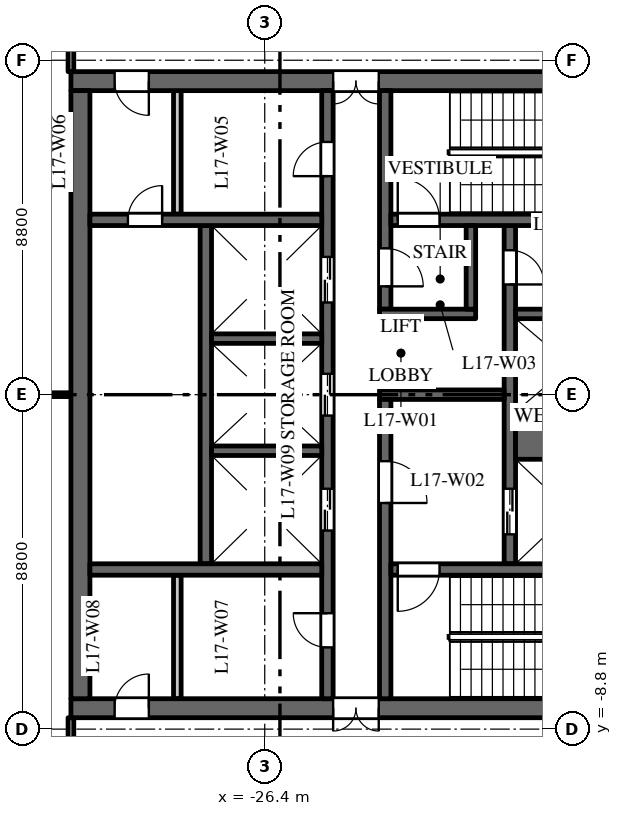
"""IFC4 building model, lengths in metres.
Left out: names, types, materials, properties, quantities, classifications, styles, units other than length and angle.
Written with IfcOpenShell. Run it as: python <this file> out.ifc"""

import sys

from ifc_helpers import new_model, si_unit, direction, frame, frame_2d, origin, place, context, subcontext, project, spatial, rectangle, extrude, element, fill, save


model = new_model("IFC4")
c1 = context("Model", 3, precision=1e-05, world=origin(), true_north=direction((0.0, 1.0)))
c2 = subcontext(c1, "Body", "Model", "MODEL_VIEW")
j1 = project(units=[si_unit("LENGTHUNIT", "METRE"), si_unit("PLANEANGLEUNIT", "RADIAN")], contexts=[c1])
p1 = place(None, origin())
s1 = spatial("IfcSite", under=j1, at=p1, CompositionType="ELEMENT")
p2 = place(p1, origin())
s2 = spatial("IfcBuilding", under=s1, at=p2, CompositionType="ELEMENT")
p3 = place(p2, frame((0.0, 0.0, 78.5)))
s3 = spatial("IfcBuildingStorey", under=s2, at=p3, CompositionType="ELEMENT", Elevation=78.5)
p4 = place(p3, frame((-16.5, 8.25, 0.0), z_axis=(0.0, 0.0, 1.0), x_axis=(-1.0, 0.0, 0.0)))
e1 = element("IfcWall", 1, at=p4, inside=s3, PredefinedType="SHEAR", context=c2, shape_type="SweptSolid", body=[
    extrude(rectangle(XDim=15.0, YDim=0.5, at=frame_2d((7.5, 0.0))), origin(), (0.0, 0.0, 1.0), 3.7),
])
p5 = place(p4, frame((6.9, 0.0, 0.0)))
e2 = element("IfcOpeningElement", 2, at=p5, cuts=e1, PredefinedType="OPENING", context=c2, shape_type="SweptSolid", body=[
    extrude(rectangle(XDim=1.2, YDim=2.1, at=frame_2d((0.6, 1.05))), frame((0.0, 0.26, 0.0), z_axis=(0.0, -1.0, 0.0), x_axis=(1.0, 0.0, 0.0)), (0.0, 0.0, 1.0), 0.52),
])
p6 = place(p4, frame((12.95, 0.0, 0.0)))
e3 = element("IfcOpeningElement", 3, at=p6, cuts=e1, PredefinedType="OPENING", context=c2, shape_type="SweptSolid", body=[
    extrude(rectangle(XDim=0.9, YDim=2.1, at=frame_2d((0.45, 1.05))), frame((0.0, 0.26, 0.0), z_axis=(0.0, -1.0, 0.0), x_axis=(1.0, 0.0, 0.0)), (0.0, 0.0, 1.0), 0.52),
])
p7 = place(p3, frame((-16.5, -8.25, 0.0), z_axis=(0.0, 0.0, 1.0), x_axis=(-1.0, 0.0, 0.0)))
e4 = element("IfcWall", 4, at=p7, inside=s3, PredefinedType="SHEAR", context=c2, shape_type="SweptSolid", body=[
    extrude(rectangle(XDim=15.0, YDim=0.5, at=frame_2d((7.5, 0.0))), origin(), (0.0, 0.0, 1.0), 3.7),
])
p8 = place(p7, frame((6.9, 0.0, 0.0)))
e5 = element("IfcOpeningElement", 5, at=p8, cuts=e4, PredefinedType="OPENING", context=c2, shape_type="SweptSolid", body=[
    extrude(rectangle(XDim=1.2, YDim=2.1, at=frame_2d((0.6, 1.05))), frame((0.0, 0.26, 0.0), z_axis=(0.0, -1.0, 0.0), x_axis=(1.0, 0.0, 0.0)), (0.0, 0.0, 1.0), 0.52),
])
p9 = place(p7, frame((12.95, 0.0, 0.0)))
e6 = element("IfcOpeningElement", 6, at=p9, cuts=e4, PredefinedType="OPENING", context=c2, shape_type="SweptSolid", body=[
    extrude(rectangle(XDim=0.9, YDim=2.1, at=frame_2d((0.45, 1.05))), frame((0.0, 0.26, 0.0), z_axis=(0.0, -1.0, 0.0), x_axis=(1.0, 0.0, 0.0)), (0.0, 0.0, 1.0), 0.52),
])
p10 = place(p3, frame((-27.95, -4.45, 0.0), z_axis=(0.0, 0.0, 1.0), x_axis=(0.0, 1.0, 0.0)))
e7 = element("IfcWall", 7, at=p10, inside=s3, PredefinedType="SHEAR", context=c2, shape_type="SweptSolid", body=[
    extrude(rectangle(XDim=8.9, YDim=0.3, at=frame_2d((4.45, 0.0))), origin(), (0.0, 0.0, 1.0), 3.7),
])
p11 = place(p3, frame((-19.95, -4.45, 0.0), z_axis=(0.0, 0.0, 1.0), x_axis=(0.0, 1.0, 0.0)))
e8 = element("IfcWall", 8, at=p11, inside=s3, PredefinedType="SHEAR", context=c2, shape_type="SweptSolid", body=[
    extrude(rectangle(XDim=8.9, YDim=0.3, at=frame_2d((4.45, 0.0))), origin(), (0.0, 0.0, 1.0), 3.7),
])
p12 = place(p11, frame((0.775, 0.0, 0.0)))
e9 = element("IfcOpeningElement", 9, at=p12, cuts=e8, PredefinedType="OPENING", context=c2, shape_type="SweptSolid", body=[
    extrude(rectangle(XDim=1.2, YDim=2.1, at=frame_2d((0.6, 1.05))), frame((0.0, 0.16, 0.0), z_axis=(0.0, -1.0, 0.0), x_axis=(1.0, 0.0, 0.0)), (0.0, 0.0, 1.0), 0.32),
])
p13 = place(p11, frame((7.35, 0.0, 0.0)))
e10 = element("IfcOpeningElement", 10, at=p13, cuts=e8, PredefinedType="OPENING", context=c2, shape_type="SweptSolid", body=[
    extrude(rectangle(XDim=0.9, YDim=2.1, at=frame_2d((0.45, 1.05))), frame((0.0, 0.16, 0.0), z_axis=(0.0, -1.0, 0.0), x_axis=(1.0, 0.0, 0.0)), (0.0, 0.0, 1.0), 0.32),
])
p14 = place(p3, frame((-24.75, -8.0, 0.0), z_axis=(0.0, 0.0, 1.0), x_axis=(0.0, 1.0, 0.0)))
e11 = element("IfcWall", 11, at=p14, inside=s3, PredefinedType="SHEAR", context=c2, shape_type="SweptSolid", body=[
    extrude(rectangle(XDim=16.0, YDim=0.3, at=frame_2d((8.0, 0.0))), origin(), (0.0, 0.0, 1.0), 3.7),
])
p15 = place(p14, frame((4.425, 0.0, 0.0)))
e12 = element("IfcOpeningElement", 12, at=p15, cuts=e11, PredefinedType="OPENING", context=c2, shape_type="SweptSolid", body=[
    extrude(rectangle(XDim=1.1, YDim=2.1, at=frame_2d((0.55, 1.05))), frame((0.0, 0.16, 0.0), z_axis=(0.0, -1.0, 0.0), x_axis=(1.0, 0.0, 0.0)), (0.0, 0.0, 1.0), 0.32),
])
p16 = place(p14, frame((7.45, 0.0, 0.0)))
e13 = element("IfcOpeningElement", 13, at=p16, cuts=e11, PredefinedType="OPENING", context=c2, shape_type="SweptSolid", body=[
    extrude(rectangle(XDim=1.1, YDim=2.1, at=frame_2d((0.55, 1.05))), frame((0.0, 0.16, 0.0), z_axis=(0.0, -1.0, 0.0), x_axis=(1.0, 0.0, 0.0)), (0.0, 0.0, 1.0), 0.32),
])
p17 = place(p14, frame((10.425, 0.0, 0.0)))
e14 = element("IfcOpeningElement", 14, at=p17, cuts=e11, PredefinedType="OPENING", context=c2, shape_type="SweptSolid", body=[
    extrude(rectangle(XDim=1.2, YDim=2.1, at=frame_2d((0.6, 1.05))), frame((0.0, 0.16, 0.0), z_axis=(0.0, -1.0, 0.0), x_axis=(1.0, 0.0, 0.0)), (0.0, 0.0, 1.0), 0.32),
])
p18 = place(p14, frame((13.75, 0.0, 0.0)))
e15 = element("IfcOpeningElement", 15, at=p18, cuts=e11, PredefinedType="OPENING", context=c2, shape_type="SweptSolid", body=[
    extrude(rectangle(XDim=0.9, YDim=2.1, at=frame_2d((0.45, 1.05))), frame((0.0, 0.16, 0.0), z_axis=(0.0, -1.0, 0.0), x_axis=(1.0, 0.0, 0.0)), (0.0, 0.0, 1.0), 0.32),
])
p19 = place(p14, frame((1.35, 0.0, 0.0)))
e16 = element("IfcOpeningElement", 16, at=p19, cuts=e11, PredefinedType="OPENING", context=c2, shape_type="SweptSolid", body=[
    extrude(rectangle(XDim=0.9, YDim=2.1, at=frame_2d((0.45, 1.05))), frame((0.0, 0.16, 0.0), z_axis=(0.0, -1.0, 0.0), x_axis=(1.0, 0.0, 0.0)), (0.0, 0.0, 1.0), 0.32),
])
p20 = place(p3, frame((-20.1, 0.0, 0.0), z_axis=(0.0, 0.0, 1.0), x_axis=(-1.0, 0.0, 0.0)))
e17 = element("IfcWall", 17, at=p20, inside=s3, PredefinedType="SHEAR", context=c2, shape_type="SweptSolid", body=[
    extrude(rectangle(XDim=3.28, YDim=0.25, at=frame_2d((1.64, 0.0))), origin(), (0.0, 0.0, 1.0), 3.7),
])
p21 = place(p3, frame((-31.25, -8.0, 0.0), z_axis=(0.0, 0.0, 1.0), x_axis=(0.0, 1.0, 0.0)))
e18 = element("IfcWall", 18, at=p21, inside=s3, PredefinedType="SHEAR", context=c2, shape_type="SweptSolid", body=[
    extrude(rectangle(XDim=16.0, YDim=0.5, at=frame_2d((8.0, 0.0))), origin(), (0.0, 0.0, 1.0), 3.7),
])
p22 = place(p3, frame((-24.9, 4.6, 0.0), z_axis=(0.0, 0.0, 1.0), x_axis=(-1.0, 0.0, 0.0)))
e19 = element("IfcWall", 19, at=p22, inside=s3, PredefinedType="SHEAR", context=c2, shape_type="SweptSolid", body=[
    extrude(rectangle(XDim=6.1, YDim=0.3, at=frame_2d((3.05, 0.0))), origin(), (0.0, 0.0, 1.0), 3.7),
])
p23 = place(p22, frame((4.2, 0.0, 0.0)))
e20 = element("IfcOpeningElement", 20, at=p23, cuts=e19, PredefinedType="OPENING", context=c2, shape_type="SweptSolid", body=[
    extrude(rectangle(XDim=0.9, YDim=2.1, at=frame_2d((0.45, 1.05))), frame((0.0, 0.16, 0.0), z_axis=(0.0, -1.0, 0.0), x_axis=(1.0, 0.0, 0.0)), (0.0, 0.0, 1.0), 0.32),
])
for number, where, z_axis, x_axis in (
    (21, (-28.7, 4.75, 0.0), (0.0, 0.0, 1.0), (0.0, 1.0, 0.0)),
    (22, (-28.7, -8.0, 0.0), (0.0, 0.0, 1.0), (0.0, 1.0, 0.0)),
):
    element("IfcWall", number, at=place(p3, frame(where, z_axis=z_axis, x_axis=x_axis)), inside=s3, PredefinedType="PARTITIONING", context=c2, shape_type="SweptSolid", body=[
        extrude(rectangle(XDim=3.25, YDim=0.2, at=frame_2d((1.625, 0.0))), origin(), (0.0, 0.0, 1.0), 3.7),
    ])
p24 = place(p3, frame((-24.9, -4.6, 0.0), z_axis=(0.0, 0.0, 1.0), x_axis=(-1.0, 0.0, 0.0)))
e23 = element("IfcWall", 23, at=p24, inside=s3, PredefinedType="SHEAR", context=c2, shape_type="SweptSolid", body=[
    extrude(rectangle(XDim=6.1, YDim=0.3, at=frame_2d((3.05, 0.0))), origin(), (0.0, 0.0, 1.0), 3.7),
])
p25 = place(p3, frame((-16.9, -1.075, 0.0), z_axis=(0.0, 0.0, 1.0), x_axis=(-1.0, 0.0, 0.0)))
e24 = element("IfcWall", 24, at=p25, inside=s3, PredefinedType="SHEAR", context=c2, shape_type="SweptSolid", body=[
    extrude(rectangle(XDim=2.9, YDim=1.25, at=frame_2d((1.45, 0.0))), origin(), (0.0, 0.0, 1.0), 3.7),
])
for number, where, z_axis, x_axis in (
    (25, (-16.9, 2.125, 0.0), (0.0, 0.0, 1.0), (-1.0, 0.0, 0.0)),
    (26, (-24.9, -1.475, 0.0), (0.0, 0.0, 1.0), (-1.0, 0.0, 0.0)),
    (27, (-24.9, 1.475, 0.0), (0.0, 0.0, 1.0), (-1.0, 0.0, 0.0)),
):
    element("IfcWall", number, at=place(p3, frame(where, z_axis=z_axis, x_axis=x_axis)), inside=s3, PredefinedType="SHEAR", context=c2, shape_type="SweptSolid", body=[
        extrude(rectangle(XDim=2.9, YDim=0.25, at=frame_2d((1.45, 0.0))), origin(), (0.0, 0.0, 1.0), 3.7),
    ])
p26 = place(p3, frame((-23.23, 2.25, 0.0), z_axis=(0.0, 0.0, 1.0), x_axis=(0.0, 1.0, 0.0)))
e28 = element("IfcWall", 28, at=p26, inside=s3, PredefinedType="SHEAR", context=c2, shape_type="SweptSolid", body=[
    extrude(rectangle(XDim=5.75, YDim=0.3, at=frame_2d((2.875, 0.0))), origin(), (0.0, 0.0, 1.0), 3.7),
])
p27 = place(p26, frame((0.6, 0.0, 0.0)))
e29 = element("IfcOpeningElement", 29, at=p27, cuts=e28, PredefinedType="OPENING", context=c2, shape_type="SweptSolid", body=[
    extrude(rectangle(XDim=1.0, YDim=2.1, at=frame_2d((0.5, 1.05))), frame((0.0, 0.16, 0.0), z_axis=(0.0, -1.0, 0.0), x_axis=(1.0, 0.0, 0.0)), (0.0, 0.0, 1.0), 0.32),
])
p28 = place(p3, frame((-23.23, -8.0, 0.0), z_axis=(0.0, 0.0, 1.0), x_axis=(0.0, 1.0, 0.0)))
e30 = element("IfcWall", 30, at=p28, inside=s3, PredefinedType="SHEAR", context=c2, shape_type="SweptSolid", body=[
    extrude(rectangle(XDim=7.875, YDim=0.3, at=frame_2d((3.938, 0.0))), origin(), (0.0, 0.0, 1.0), 3.7),
])
p29 = place(p28, frame((5.15, 0.0, 0.0)))
e31 = element("IfcOpeningElement", 31, at=p29, cuts=e30, PredefinedType="OPENING", context=c2, shape_type="SweptSolid", body=[
    extrude(rectangle(XDim=1.1, YDim=2.1, at=frame_2d((0.55, 1.05))), frame((0.0, 0.16, 0.0), z_axis=(0.0, -1.0, 0.0), x_axis=(1.0, 0.0, 0.0)), (0.0, 0.0, 1.0), 0.32),
])
p30 = place(p3, frame((-16.9, 4.6, 0.0), z_axis=(0.0, 0.0, 1.0), x_axis=(-1.0, 0.0, 0.0)))
e32 = element("IfcWall", 32, at=p30, inside=s3, PredefinedType="SHEAR", context=c2, shape_type="SweptSolid", body=[
    extrude(rectangle(XDim=6.18, YDim=0.3, at=frame_2d((3.09, 0.0))), origin(), (0.0, 0.0, 1.0), 3.7),
])
p31 = place(p30, frame((4.9, 0.0, 0.0)))
e33 = element("IfcOpeningElement", 33, at=p31, cuts=e32, PredefinedType="OPENING", context=c2, shape_type="SweptSolid", body=[
    extrude(rectangle(XDim=1.1, YDim=2.1, at=frame_2d((0.55, 1.05))), frame((0.0, 0.16, 0.0), z_axis=(0.0, -1.0, 0.0), x_axis=(1.0, 0.0, 0.0)), (0.0, 0.0, 1.0), 0.32),
])
p32 = place(p3, frame((-16.9, -4.6, 0.0), z_axis=(0.0, 0.0, 1.0), x_axis=(-1.0, 0.0, 0.0)))
e34 = element("IfcWall", 34, at=p32, inside=s3, PredefinedType="SHEAR", context=c2, shape_type="SweptSolid", body=[
    extrude(rectangle(XDim=6.18, YDim=0.3, at=frame_2d((3.09, 0.0))), origin(), (0.0, 0.0, 1.0), 3.7),
])
p33 = place(p32, frame((4.9, 0.0, 0.0)))
e35 = element("IfcOpeningElement", 35, at=p33, cuts=e34, PredefinedType="OPENING", context=c2, shape_type="SweptSolid", body=[
    extrude(rectangle(XDim=1.1, YDim=2.1, at=frame_2d((0.55, 1.05))), frame((0.0, 0.16, 0.0), z_axis=(0.0, -1.0, 0.0), x_axis=(1.0, 0.0, 0.0)), (0.0, 0.0, 1.0), 0.32),
])
p34 = place(p3, frame((-20.85, 2.125, 0.0), z_axis=(0.0, 0.0, 1.0), x_axis=(-1.0, 0.0, 0.0)))
e36 = element("IfcWall", 36, at=p34, inside=s3, PredefinedType="SHEAR", context=c2, shape_type="SweptSolid", body=[
    extrude(rectangle(XDim=2.53, YDim=0.25, at=frame_2d((1.265, 0.0))), origin(), (0.0, 0.0, 1.0), 3.7),
])
p35 = place(p3, frame((-20.975, 2.25, 0.0), z_axis=(0.0, 0.0, 1.0), x_axis=(0.0, 1.0, 0.0)))
e37 = element("IfcWall", 37, at=p35, inside=s3, PredefinedType="SHEAR", context=c2, shape_type="SweptSolid", body=[
    extrude(rectangle(XDim=2.2, YDim=0.25, at=frame_2d((1.1, 0.0))), origin(), (0.0, 0.0, 1.0), 3.7),
])
p36 = place(p3, frame((-35.949, 0.0, 0.0), z_axis=(0.0, 0.0, 1.0), x_axis=(1.0, 0.0, 0.0)))
e38 = element("IfcWall", 38, at=p36, inside=s3, PredefinedType="PARTITIONING", context=c2, shape_type="SweptSolid", body=[
    extrude(rectangle(XDim=4.449, YDim=0.1, at=frame_2d((2.225, 0.0))), origin(), (0.0, 0.0, 1.0), 2.85),
])
for number, where, z_axis, x_axis in (
    (39, (-31.5, -10.7, 0.0), (0.0, 0.0, 1.0), (0.0, 1.0, 0.0)),
    (40, (-31.5, 8.5, 0.0), (0.0, 0.0, 1.0), (0.0, 1.0, 0.0)),
):
    element("IfcWall", number, at=place(p3, frame(where, z_axis=z_axis, x_axis=x_axis)), inside=s3, PredefinedType="PARTITIONING", context=c2, shape_type="SweptSolid", body=[
        extrude(rectangle(XDim=2.2, YDim=0.15, at=frame_2d((1.1, 0.0))), origin(), (0.0, 0.0, 1.0), 3.7),
    ])
p37 = place(p12, origin())
e41 = element("IfcDoor", 41, at=p37, inside=s3, OperationType="DOUBLE_DOOR_SLIDING", PredefinedType="DOOR", context=c2, shape_type="SweptSolid", body=[
    extrude(rectangle(XDim=1.2, YDim=2.1, at=frame_2d((0.6, 1.05))), frame((0.0, 0.025, 0.0), z_axis=(0.0, -1.0, 0.0), x_axis=(1.0, 0.0, 0.0)), (0.0, 0.0, 1.0), 0.05),
])
fill(e9, e41)
p38 = place(p15, origin())
e42 = element("IfcDoor", 42, at=p38, inside=s3, OperationType="DOUBLE_DOOR_SLIDING", PredefinedType="DOOR", context=c2, shape_type="SweptSolid", body=[
    extrude(rectangle(XDim=1.1, YDim=2.1, at=frame_2d((0.55, 1.05))), frame((0.0, 0.025, 0.0), z_axis=(0.0, -1.0, 0.0), x_axis=(1.0, 0.0, 0.0)), (0.0, 0.0, 1.0), 0.05),
])
fill(e12, e42)
p39 = place(p16, origin())
e43 = element("IfcDoor", 43, at=p39, inside=s3, OperationType="DOUBLE_DOOR_SLIDING", PredefinedType="DOOR", context=c2, shape_type="SweptSolid", body=[
    extrude(rectangle(XDim=1.1, YDim=2.1, at=frame_2d((0.55, 1.05))), frame((0.0, 0.025, 0.0), z_axis=(0.0, -1.0, 0.0), x_axis=(1.0, 0.0, 0.0)), (0.0, 0.0, 1.0), 0.05),
])
fill(e13, e43)
p40 = place(p17, origin())
e44 = element("IfcDoor", 44, at=p40, inside=s3, OperationType="DOUBLE_DOOR_SLIDING", PredefinedType="DOOR", context=c2, shape_type="SweptSolid", body=[
    extrude(rectangle(XDim=1.2, YDim=2.1, at=frame_2d((0.6, 1.05))), frame((0.0, 0.025, 0.0), z_axis=(0.0, -1.0, 0.0), x_axis=(1.0, 0.0, 0.0)), (0.0, 0.0, 1.0), 0.05),
])
fill(e14, e44)
p41 = place(p31, origin())
e45 = element("IfcDoor", 45, at=p41, inside=s3, OperationType="SINGLE_SWING_RIGHT", PredefinedType="DOOR", context=c2, shape_type="SweptSolid", body=[
    extrude(rectangle(XDim=1.1, YDim=2.1, at=frame_2d((0.55, 1.05))), frame((0.0, 0.025, 0.0), z_axis=(0.0, -1.0, 0.0), x_axis=(1.0, 0.0, 0.0)), (0.0, 0.0, 1.0), 0.05),
])
fill(e33, e45)
p42 = place(p33, origin())
e46 = element("IfcDoor", 46, at=p42, inside=s3, OperationType="SINGLE_SWING_LEFT", PredefinedType="DOOR", context=c2, shape_type="SweptSolid", body=[
    extrude(rectangle(XDim=1.1, YDim=2.1, at=frame_2d((0.55, 1.05))), frame((0.0, 0.025, 0.0), z_axis=(0.0, -1.0, 0.0), x_axis=(1.0, 0.0, 0.0)), (0.0, 0.0, 1.0), 0.05),
])
fill(e35, e46)
p43 = place(p29, origin())
e47 = element("IfcDoor", 47, at=p43, inside=s3, OperationType="SINGLE_SWING_LEFT", PredefinedType="DOOR", context=c2, shape_type="SweptSolid", body=[
    extrude(rectangle(XDim=1.1, YDim=2.1, at=frame_2d((0.55, 1.05))), frame((0.0, 0.025, 0.0), z_axis=(0.0, -1.0, 0.0), x_axis=(1.0, 0.0, 0.0)), (0.0, 0.0, 1.0), 0.05),
])
fill(e31, e47)
p44 = place(p27, origin())
e48 = element("IfcDoor", 48, at=p44, inside=s3, OperationType="SINGLE_SWING_LEFT", PredefinedType="DOOR", context=c2, shape_type="SweptSolid", body=[
    extrude(rectangle(XDim=1.0, YDim=2.1, at=frame_2d((0.5, 1.05))), frame((0.0, 0.025, 0.0), z_axis=(0.0, -1.0, 0.0), x_axis=(1.0, 0.0, 0.0)), (0.0, 0.0, 1.0), 0.05),
])
fill(e29, e48)
p45 = place(p5, origin())
e49 = element("IfcDoor", 49, at=p45, inside=s3, OperationType="DOUBLE_DOOR_DOUBLE_SWING", PredefinedType="DOOR", context=c2, shape_type="SweptSolid", body=[
    extrude(rectangle(XDim=1.2, YDim=2.1, at=frame_2d((0.6, 1.05))), frame((0.0, 0.025, 0.0), z_axis=(0.0, -1.0, 0.0), x_axis=(1.0, 0.0, 0.0)), (0.0, 0.0, 1.0), 0.05),
])
fill(e2, e49)
p46 = place(p8, origin())
e50 = element("IfcDoor", 50, at=p46, inside=s3, OperationType="DOUBLE_DOOR_DOUBLE_SWING", PredefinedType="DOOR", context=c2, shape_type="SweptSolid", body=[
    extrude(rectangle(XDim=1.2, YDim=2.1, at=frame_2d((0.6, 1.05))), frame((0.0, 0.025, 0.0), z_axis=(0.0, -1.0, 0.0), x_axis=(1.0, 0.0, 0.0)), (0.0, 0.0, 1.0), 0.05),
])
fill(e5, e50)
p47 = place(p13, origin())
e51 = element("IfcDoor", 51, at=p47, inside=s3, OperationType="SINGLE_SWING_LEFT", PredefinedType="DOOR", context=c2, shape_type="SweptSolid", body=[
    extrude(rectangle(XDim=0.9, YDim=2.1, at=frame_2d((0.45, 1.05))), frame((0.0, 0.025, 0.0), z_axis=(0.0, -1.0, 0.0), x_axis=(1.0, 0.0, 0.0)), (0.0, 0.0, 1.0), 0.05),
])
fill(e10, e51)
p48 = place(p18, origin())
e52 = element("IfcDoor", 52, at=p48, inside=s3, OperationType="SINGLE_SWING_RIGHT", PredefinedType="DOOR", context=c2, shape_type="SweptSolid", body=[
    extrude(rectangle(XDim=0.9, YDim=2.1, at=frame_2d((0.45, 1.05))), frame((0.0, 0.025, 0.0), z_axis=(0.0, -1.0, 0.0), x_axis=(1.0, 0.0, 0.0)), (0.0, 0.0, 1.0), 0.05),
])
fill(e15, e52)
p49 = place(p6, origin())
e53 = element("IfcDoor", 53, at=p49, inside=s3, OperationType="SINGLE_SWING_RIGHT", PredefinedType="DOOR", context=c2, shape_type="SweptSolid", body=[
    extrude(rectangle(XDim=0.9, YDim=2.1, at=frame_2d((0.45, 1.05))), frame((0.0, 0.025, 0.0), z_axis=(0.0, -1.0, 0.0), x_axis=(1.0, 0.0, 0.0)), (0.0, 0.0, 1.0), 0.05),
])
fill(e3, e53)
p50 = place(p19, origin())
e54 = element("IfcDoor", 54, at=p50, inside=s3, OperationType="SINGLE_SWING_LEFT", PredefinedType="DOOR", context=c2, shape_type="SweptSolid", body=[
    extrude(rectangle(XDim=0.9, YDim=2.1, at=frame_2d((0.45, 1.05))), frame((0.0, 0.025, 0.0), z_axis=(0.0, -1.0, 0.0), x_axis=(1.0, 0.0, 0.0)), (0.0, 0.0, 1.0), 0.05),
])
fill(e16, e54)
p51 = place(p9, origin())
e55 = element("IfcDoor", 55, at=p51, inside=s3, OperationType="SINGLE_SWING_LEFT", PredefinedType="DOOR", context=c2, shape_type="SweptSolid", body=[
    extrude(rectangle(XDim=0.9, YDim=2.1, at=frame_2d((0.45, 1.05))), frame((0.0, 0.025, 0.0), z_axis=(0.0, -1.0, 0.0), x_axis=(1.0, 0.0, 0.0)), (0.0, 0.0, 1.0), 0.05),
])
fill(e6, e55)
p52 = place(p23, origin())
e56 = element("IfcDoor", 56, at=p52, inside=s3, OperationType="SINGLE_SWING_LEFT", PredefinedType="DOOR", context=c2, shape_type="SweptSolid", body=[
    extrude(rectangle(XDim=0.9, YDim=2.1, at=frame_2d((0.45, 1.05))), frame((0.0, 0.025, 0.0), z_axis=(0.0, -1.0, 0.0), x_axis=(1.0, 0.0, 0.0)), (0.0, 0.0, 1.0), 0.05),
])
fill(e20, e56)
save(model, sys.argv[1])
